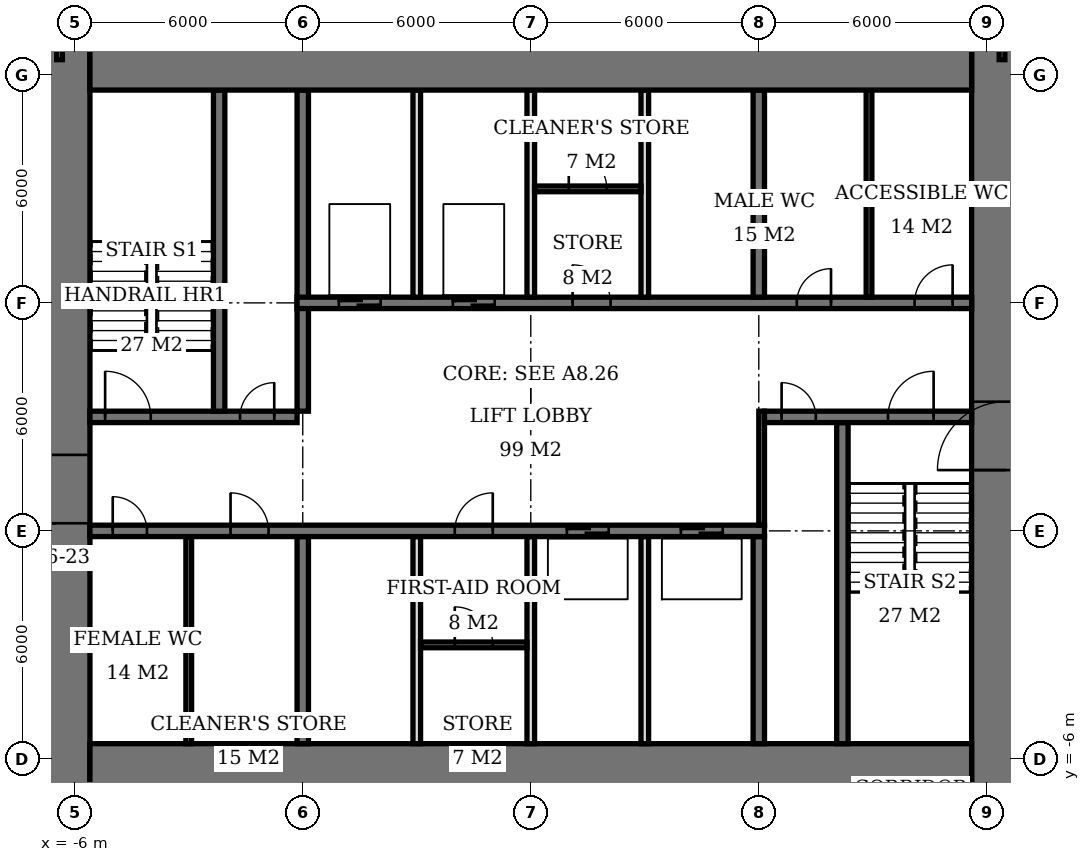
"""IFC4 building model, lengths in metres.
Left out: names, types, materials, properties, quantities, classifications, styles, units other than length and angle.
Written with IfcOpenShell. Run it as: python <this file> out.ifc"""

import sys

from ifc_helpers import new_model, si_unit, direction, frame, frame_2d, origin, place, context, subcontext, project, spatial, rectangle, extrude, element, fill, save


model = new_model("IFC4")
c1 = context("Model", 3, precision=1e-05, world=origin(), true_north=direction((0.0, 1.0)))
c2 = subcontext(c1, "Body", "Model", "MODEL_VIEW")
j1 = project(units=[si_unit("LENGTHUNIT", "METRE"), si_unit("PLANEANGLEUNIT", "RADIAN")], contexts=[c1])
p1 = place(None, origin())
s1 = spatial("IfcSite", under=j1, at=p1, CompositionType="ELEMENT")
p2 = place(p1, origin())
s2 = spatial("IfcBuilding", under=s1, at=p2, CompositionType="ELEMENT")
p3 = place(p2, frame((0.0, 0.0, 227.9)))
s3 = spatial("IfcBuildingStorey", under=s2, at=p3, CompositionType="ELEMENT", Elevation=227.9)
for number, where, z_axis, x_axis in (
    (1, (-5.6, -6.6, 0.0), (0.0, 0.0, 1.0), (1.0, 0.0, 0.0)),
    (2, (-5.6, 12.6, 0.0), (0.0, 0.0, 1.0), (1.0, 0.0, 0.0)),
):
    element("IfcWall", number, at=place(p3, frame(where, z_axis=z_axis, x_axis=x_axis)), inside=s3, PredefinedType="SHEAR", context=c2, shape_type="SweptSolid", body=[
        extrude(rectangle(XDim=23.2, YDim=2.0, at=frame_2d((11.6, 0.0))), origin(), (0.0, 0.0, 1.0), 3.9),
    ])
p4 = place(p3, frame((-6.5, -7.6, 0.0), z_axis=(0.0, 0.0, 1.0), x_axis=(0.0, 1.0, 0.0)))
e3 = element("IfcWall", 3, at=p4, inside=s3, PredefinedType="SHEAR", context=c2, shape_type="SweptSolid", body=[
    extrude(rectangle(XDim=21.2, YDim=1.8, at=frame_2d((10.6, 0.0))), origin(), (0.0, 0.0, 1.0), 3.9),
])
p5 = place(p4, frame((7.8, 0.0, 0.0)))
e4 = element("IfcOpeningElement", 4, at=p5, cuts=e3, PredefinedType="OPENING", context=c2, shape_type="SweptSolid", body=[
    extrude(rectangle(XDim=1.8, YDim=2.4, at=frame_2d((0.9, 1.2))), frame((0.0, 0.91, 0.0), z_axis=(0.0, -1.0, 0.0), x_axis=(1.0, 0.0, 0.0)), (0.0, 0.0, 1.0), 1.82),
])
p6 = place(p3, frame((18.5, -7.6, 0.0), z_axis=(0.0, 0.0, 1.0), x_axis=(0.0, 1.0, 0.0)))
e5 = element("IfcWall", 5, at=p6, inside=s3, PredefinedType="SHEAR", context=c2, shape_type="SweptSolid", body=[
    extrude(rectangle(XDim=21.2, YDim=1.8, at=frame_2d((10.6, 0.0))), origin(), (0.0, 0.0, 1.0), 3.9),
])
p7 = place(p6, frame((9.2, 0.0, 0.0)))
e6 = element("IfcOpeningElement", 6, at=p7, cuts=e5, PredefinedType="OPENING", context=c2, shape_type="SweptSolid", body=[
    extrude(rectangle(XDim=1.8, YDim=2.4, at=frame_2d((0.9, 1.2))), frame((0.0, 0.91, 0.0), z_axis=(0.0, -1.0, 0.0), x_axis=(1.0, 0.0, 0.0)), (0.0, 0.0, 1.0), 1.82),
])
p8 = place(p3, frame((-5.6, 0.0, 0.0), z_axis=(0.0, 0.0, 1.0), x_axis=(1.0, 0.0, 0.0)))
e7 = element("IfcWall", 7, at=p8, inside=s3, PredefinedType="SHEAR", context=c2, shape_type="SweptSolid", body=[
    extrude(rectangle(XDim=17.75, YDim=0.3, at=frame_2d((8.875, 0.0))), origin(), (0.0, 0.0, 1.0), 3.9),
])
p9 = place(p8, frame((0.6, 0.0, 0.0)))
e8 = element("IfcOpeningElement", 8, at=p9, cuts=e7, PredefinedType="OPENING", context=c2, shape_type="SweptSolid", body=[
    extrude(rectangle(XDim=0.9, YDim=2.1, at=frame_2d((0.45, 1.05))), frame((0.0, 0.16, 0.0), z_axis=(0.0, -1.0, 0.0), x_axis=(1.0, 0.0, 0.0)), (0.0, 0.0, 1.0), 0.32),
])
p10 = place(p8, frame((3.7, 0.0, 0.0)))
e9 = element("IfcOpeningElement", 9, at=p10, cuts=e7, PredefinedType="OPENING", context=c2, shape_type="SweptSolid", body=[
    extrude(rectangle(XDim=1.0, YDim=2.1, at=frame_2d((0.5, 1.05))), frame((0.0, 0.16, 0.0), z_axis=(0.0, -1.0, 0.0), x_axis=(1.0, 0.0, 0.0)), (0.0, 0.0, 1.0), 0.32),
])
p11 = place(p8, frame((9.6, 0.0, 0.0)))
e10 = element("IfcOpeningElement", 10, at=p11, cuts=e7, PredefinedType="OPENING", context=c2, shape_type="SweptSolid", body=[
    extrude(rectangle(XDim=1.0, YDim=2.1, at=frame_2d((0.5, 1.05))), frame((0.0, 0.16, 0.0), z_axis=(0.0, -1.0, 0.0), x_axis=(1.0, 0.0, 0.0)), (0.0, 0.0, 1.0), 0.32),
])
p12 = place(p8, frame((12.55, 0.0, 0.0)))
e11 = element("IfcOpeningElement", 11, at=p12, cuts=e7, PredefinedType="OPENING", context=c2, shape_type="SweptSolid", body=[
    extrude(rectangle(XDim=1.1, YDim=2.1, at=frame_2d((0.55, 1.05))), frame((0.0, 0.16, 0.0), z_axis=(0.0, -1.0, 0.0), x_axis=(1.0, 0.0, 0.0)), (0.0, 0.0, 1.0), 0.32),
])
p13 = place(p8, frame((15.55, 0.0, 0.0)))
e12 = element("IfcOpeningElement", 12, at=p13, cuts=e7, PredefinedType="OPENING", context=c2, shape_type="SweptSolid", body=[
    extrude(rectangle(XDim=1.1, YDim=2.1, at=frame_2d((0.55, 1.05))), frame((0.0, 0.16, 0.0), z_axis=(0.0, -1.0, 0.0), x_axis=(1.0, 0.0, 0.0)), (0.0, 0.0, 1.0), 0.32),
])
p14 = place(p3, frame((-5.6, 3.0, 0.0), z_axis=(0.0, 0.0, 1.0), x_axis=(1.0, 0.0, 0.0)))
e13 = element("IfcWall", 13, at=p14, inside=s3, PredefinedType="SHEAR", context=c2, shape_type="SweptSolid", body=[
    extrude(rectangle(XDim=5.45, YDim=0.3, at=frame_2d((2.725, 0.0))), origin(), (0.0, 0.0, 1.0), 3.9),
])
p15 = place(p14, frame((0.4, 0.0, 0.0)))
e14 = element("IfcOpeningElement", 14, at=p15, cuts=e13, PredefinedType="OPENING", context=c2, shape_type="SweptSolid", body=[
    extrude(rectangle(XDim=1.2, YDim=2.1, at=frame_2d((0.6, 1.05))), frame((0.0, 0.16, 0.0), z_axis=(0.0, -1.0, 0.0), x_axis=(1.0, 0.0, 0.0)), (0.0, 0.0, 1.0), 0.32),
])
p16 = place(p14, frame((3.95, 0.0, 0.0)))
e15 = element("IfcOpeningElement", 15, at=p16, cuts=e13, PredefinedType="OPENING", context=c2, shape_type="SweptSolid", body=[
    extrude(rectangle(XDim=0.9, YDim=2.1, at=frame_2d((0.45, 1.05))), frame((0.0, 0.16, 0.0), z_axis=(0.0, -1.0, 0.0), x_axis=(1.0, 0.0, 0.0)), (0.0, 0.0, 1.0), 0.32),
])
p17 = place(p3, frame((12.15, 3.0, 0.0), z_axis=(0.0, 0.0, 1.0), x_axis=(1.0, 0.0, 0.0)))
e16 = element("IfcWall", 16, at=p17, inside=s3, PredefinedType="SHEAR", context=c2, shape_type="SweptSolid", body=[
    extrude(rectangle(XDim=5.45, YDim=0.3, at=frame_2d((2.725, 0.0))), origin(), (0.0, 0.0, 1.0), 3.9),
])
p18 = place(p17, frame((3.25, 0.0, 0.0)))
e17 = element("IfcOpeningElement", 17, at=p18, cuts=e16, PredefinedType="OPENING", context=c2, shape_type="SweptSolid", body=[
    extrude(rectangle(XDim=1.2, YDim=2.1, at=frame_2d((0.6, 1.05))), frame((0.0, 0.16, 0.0), z_axis=(0.0, -1.0, 0.0), x_axis=(1.0, 0.0, 0.0)), (0.0, 0.0, 1.0), 0.32),
])
p19 = place(p17, frame((0.45, 0.0, 0.0)))
e18 = element("IfcOpeningElement", 18, at=p19, cuts=e16, PredefinedType="OPENING", context=c2, shape_type="SweptSolid", body=[
    extrude(rectangle(XDim=0.9, YDim=2.1, at=frame_2d((0.45, 1.05))), frame((0.0, 0.16, 0.0), z_axis=(0.0, -1.0, 0.0), x_axis=(1.0, 0.0, 0.0)), (0.0, 0.0, 1.0), 0.32),
])
p20 = place(p3, frame((-0.15, 6.0, 0.0), z_axis=(0.0, 0.0, 1.0), x_axis=(1.0, 0.0, 0.0)))
e19 = element("IfcWall", 19, at=p20, inside=s3, PredefinedType="SHEAR", context=c2, shape_type="SweptSolid", body=[
    extrude(rectangle(XDim=17.75, YDim=0.3, at=frame_2d((8.875, 0.0))), origin(), (0.0, 0.0, 1.0), 3.9),
])
p21 = place(p20, frame((13.15, 0.0, 0.0)))
e20 = element("IfcOpeningElement", 20, at=p21, cuts=e19, PredefinedType="OPENING", context=c2, shape_type="SweptSolid", body=[
    extrude(rectangle(XDim=0.9, YDim=2.1, at=frame_2d((0.45, 1.05))), frame((0.0, 0.16, 0.0), z_axis=(0.0, -1.0, 0.0), x_axis=(1.0, 0.0, 0.0)), (0.0, 0.0, 1.0), 0.32),
])
p22 = place(p20, frame((16.25, 0.0, 0.0)))
e21 = element("IfcOpeningElement", 21, at=p22, cuts=e19, PredefinedType="OPENING", context=c2, shape_type="SweptSolid", body=[
    extrude(rectangle(XDim=1.0, YDim=2.1, at=frame_2d((0.5, 1.05))), frame((0.0, 0.16, 0.0), z_axis=(0.0, -1.0, 0.0), x_axis=(1.0, 0.0, 0.0)), (0.0, 0.0, 1.0), 0.32),
])
p23 = place(p20, frame((7.25, 0.0, 0.0)))
e22 = element("IfcOpeningElement", 22, at=p23, cuts=e19, PredefinedType="OPENING", context=c2, shape_type="SweptSolid", body=[
    extrude(rectangle(XDim=1.0, YDim=2.1, at=frame_2d((0.5, 1.05))), frame((0.0, 0.16, 0.0), z_axis=(0.0, -1.0, 0.0), x_axis=(1.0, 0.0, 0.0)), (0.0, 0.0, 1.0), 0.32),
])
p24 = place(p20, frame((1.1, 0.0, 0.0)))
e23 = element("IfcOpeningElement", 23, at=p24, cuts=e19, PredefinedType="OPENING", context=c2, shape_type="SweptSolid", body=[
    extrude(rectangle(XDim=1.1, YDim=2.1, at=frame_2d((0.55, 1.05))), frame((0.0, 0.16, 0.0), z_axis=(0.0, -1.0, 0.0), x_axis=(1.0, 0.0, 0.0)), (0.0, 0.0, 1.0), 0.32),
])
p25 = place(p20, frame((4.1, 0.0, 0.0)))
e24 = element("IfcOpeningElement", 24, at=p25, cuts=e19, PredefinedType="OPENING", context=c2, shape_type="SweptSolid", body=[
    extrude(rectangle(XDim=1.1, YDim=2.1, at=frame_2d((0.55, 1.05))), frame((0.0, 0.16, 0.0), z_axis=(0.0, -1.0, 0.0), x_axis=(1.0, 0.0, 0.0)), (0.0, 0.0, 1.0), 0.32),
])
p26 = place(p3, frame((0.0, -5.6, 0.0), z_axis=(0.0, 0.0, 1.0), x_axis=(0.0, 1.0, 0.0)))
e25 = element("IfcWall", 25, at=p26, inside=s3, PredefinedType="SHEAR", context=c2, shape_type="SweptSolid", body=[
    extrude(rectangle(XDim=5.45, YDim=0.3, at=frame_2d((2.725, 0.0))), origin(), (0.0, 0.0, 1.0), 3.9),
])
p27 = place(p3, frame((0.0, 3.15, 0.0), z_axis=(0.0, 0.0, 1.0), x_axis=(0.0, 1.0, 0.0)))
e26 = element("IfcWall", 26, at=p27, inside=s3, PredefinedType="SHEAR", context=c2, shape_type="SweptSolid", body=[
    extrude(rectangle(XDim=8.45, YDim=0.3, at=frame_2d((4.225, 0.0))), origin(), (0.0, 0.0, 1.0), 3.9),
])
for number, where, z_axis, x_axis in (
    (27, (12.0, -5.6, 0.0), (0.0, 0.0, 1.0), (0.0, 1.0, 0.0)),
    (28, (12.0, 6.15, 0.0), (0.0, 0.0, 1.0), (0.0, 1.0, 0.0)),
):
    element("IfcWall", number, at=place(p3, frame(where, z_axis=z_axis, x_axis=x_axis)), inside=s3, PredefinedType="SHEAR", context=c2, shape_type="SweptSolid", body=[
        extrude(rectangle(XDim=5.45, YDim=0.3, at=frame_2d((2.725, 0.0))), origin(), (0.0, 0.0, 1.0), 3.9),
    ])
for number, where, z_axis, x_axis in (
    (29, (-2.2, 3.15, 0.0), (0.0, 0.0, 1.0), (0.0, 1.0, 0.0)),
    (30, (14.2, -5.6, 0.0), (0.0, 0.0, 1.0), (0.0, 1.0, 0.0)),
):
    element("IfcWall", number, at=place(p3, frame(where, z_axis=z_axis, x_axis=x_axis)), inside=s3, PredefinedType="SHEAR", context=c2, shape_type="SweptSolid", body=[
        extrude(rectangle(XDim=8.45, YDim=0.3, at=frame_2d((4.225, 0.0))), origin(), (0.0, 0.0, 1.0), 3.9),
    ])
for number, where, z_axis, x_axis in (
    (31, (3.0, 6.15, 0.0), (0.0, 0.0, 1.0), (0.0, 1.0, 0.0)),
    (32, (6.0, 6.15, 0.0), (0.0, 0.0, 1.0), (0.0, 1.0, 0.0)),
    (33, (9.0, 6.15, 0.0), (0.0, 0.0, 1.0), (0.0, 1.0, 0.0)),
    (34, (3.0, -5.6, 0.0), (0.0, 0.0, 1.0), (0.0, 1.0, 0.0)),
    (35, (6.0, -5.6, 0.0), (0.0, 0.0, 1.0), (0.0, 1.0, 0.0)),
    (36, (9.0, -5.6, 0.0), (0.0, 0.0, 1.0), (0.0, 1.0, 0.0)),
):
    element("IfcWall", number, at=place(p3, frame(where, z_axis=z_axis, x_axis=x_axis)), inside=s3, PredefinedType="SOLIDWALL", context=c2, shape_type="SweptSolid", body=[
        extrude(rectangle(XDim=5.45, YDim=0.2, at=frame_2d((2.725, 0.0))), origin(), (0.0, 0.0, 1.0), 3.9),
    ])
for number, where, z_axis, x_axis in (
    (37, (-3.0, -5.6, 0.0), (0.0, 0.0, 1.0), (0.0, 1.0, 0.0)),
    (38, (14.9, 6.15, 0.0), (0.0, 0.0, 1.0), (0.0, 1.0, 0.0)),
):
    element("IfcWall", number, at=place(p3, frame(where, z_axis=z_axis, x_axis=x_axis)), inside=s3, PredefinedType="PLUMBINGWALL", context=c2, shape_type="SweptSolid", body=[
        extrude(rectangle(XDim=5.45, YDim=0.15, at=frame_2d((2.725, 0.0))), origin(), (0.0, 0.0, 1.0), 3.65),
    ])
p28 = place(p3, frame((6.1, 9.0, 0.0), z_axis=(0.0, 0.0, 1.0), x_axis=(1.0, 0.0, 0.0)))
e39 = element("IfcWall", 39, at=p28, inside=s3, PredefinedType="PARTITIONING", context=c2, shape_type="SweptSolid", body=[
    extrude(rectangle(XDim=2.8, YDim=0.15, at=frame_2d((1.4, 0.0))), origin(), (0.0, 0.0, 1.0), 3.65),
])
p29 = place(p28, frame((0.9, 0.0, 0.0)))
e40 = element("IfcOpeningElement", 40, at=p29, cuts=e39, PredefinedType="OPENING", context=c2, shape_type="SweptSolid", body=[
    extrude(rectangle(XDim=1.0, YDim=2.1, at=frame_2d((0.5, 1.05))), frame((0.0, 0.085, 0.0), z_axis=(0.0, -1.0, 0.0), x_axis=(1.0, 0.0, 0.0)), (0.0, 0.0, 1.0), 0.17),
])
p30 = place(p3, frame((3.1, -3.0, 0.0), z_axis=(0.0, 0.0, 1.0), x_axis=(1.0, 0.0, 0.0)))
e41 = element("IfcWall", 41, at=p30, inside=s3, PredefinedType="PARTITIONING", context=c2, shape_type="SweptSolid", body=[
    extrude(rectangle(XDim=2.8, YDim=0.15, at=frame_2d((1.4, 0.0))), origin(), (0.0, 0.0, 1.0), 3.65),
])
p31 = place(p30, frame((0.9, 0.0, 0.0)))
e42 = element("IfcOpeningElement", 42, at=p31, cuts=e41, PredefinedType="OPENING", context=c2, shape_type="SweptSolid", body=[
    extrude(rectangle(XDim=1.0, YDim=2.1, at=frame_2d((0.5, 1.05))), frame((0.0, 0.085, 0.0), z_axis=(0.0, -1.0, 0.0), x_axis=(1.0, 0.0, 0.0)), (0.0, 0.0, 1.0), 0.17),
])
p32 = place(p3, frame((-6.4, 12.4, 0.0), z_axis=(0.0, 0.0, 1.0), x_axis=(0.0, 1.0, 0.0)))
e43 = element("IfcWall", 43, at=p32, inside=s3, PredefinedType="PARTITIONING", context=c2, shape_type="SweptSolid", body=[
    extrude(rectangle(XDim=1.2, YDim=0.15, at=frame_2d((0.6, 0.0))), origin(), (0.0, 0.0, 1.0), 3.65),
])
p33 = place(p3, frame((1.5, 12.4, 0.0), z_axis=(0.0, 0.0, 1.0), x_axis=(0.0, 1.0, 0.0)))
e44 = element("IfcWall", 44, at=p33, inside=s3, PredefinedType="PARTITIONING", context=c2, shape_type="SweptSolid", body=[
    extrude(rectangle(XDim=7.025, YDim=0.15, at=frame_2d((3.513, 0.0))), origin(), (0.0, 0.0, 1.0), 3.65),
])
p34 = place(p3, frame((18.4, 12.4, 0.0), z_axis=(0.0, 0.0, 1.0), x_axis=(0.0, 1.0, 0.0)))
e45 = element("IfcWall", 45, at=p34, inside=s3, PredefinedType="PARTITIONING", context=c2, shape_type="SweptSolid", body=[
    extrude(rectangle(XDim=1.2, YDim=0.15, at=frame_2d((0.6, 0.0))), origin(), (0.0, 0.0, 1.0), 3.65),
])
p35 = place(p3, frame((12.075, 0.15, 0.0), z_axis=(0.0, 0.0, 1.0), x_axis=(0.0, 1.0, 0.0)))
e46 = element("IfcWall", 46, at=p35, inside=s3, PredefinedType="PARTITIONING", context=c2, shape_type="SweptSolid", body=[
    extrude(rectangle(XDim=3.0, YDim=0.15, at=frame_2d((1.5, 0.0))), origin(), (0.0, 0.0, 1.0), 3.65),
])
p36 = place(p5, origin())
e47 = element("IfcDoor", 47, at=p36, inside=s3, OperationType="DOUBLE_DOOR_SINGLE_SWING", PredefinedType="DOOR", context=c2, shape_type="SweptSolid", body=[
    extrude(rectangle(XDim=1.8, YDim=2.4, at=frame_2d((0.9, 1.2))), frame((0.0, 0.025, 0.0), z_axis=(0.0, -1.0, 0.0), x_axis=(1.0, 0.0, 0.0)), (0.0, 0.0, 1.0), 0.05),
])
fill(e4, e47)
p37 = place(p7, origin())
e48 = element("IfcDoor", 48, at=p37, inside=s3, OperationType="DOUBLE_DOOR_SINGLE_SWING", PredefinedType="DOOR", context=c2, shape_type="SweptSolid", body=[
    extrude(rectangle(XDim=1.8, YDim=2.4, at=frame_2d((0.9, 1.2))), frame((0.0, 0.025, 0.0), z_axis=(0.0, -1.0, 0.0), x_axis=(1.0, 0.0, 0.0)), (0.0, 0.0, 1.0), 0.05),
])
fill(e6, e48)
p38 = place(p15, origin())
e49 = element("IfcDoor", 49, at=p38, inside=s3, OperationType="SINGLE_SWING_LEFT", PredefinedType="DOOR", context=c2, shape_type="SweptSolid", body=[
    extrude(rectangle(XDim=1.2, YDim=2.1, at=frame_2d((0.6, 1.05))), frame((0.0, 0.025, 0.0), z_axis=(0.0, -1.0, 0.0), x_axis=(1.0, 0.0, 0.0)), (0.0, 0.0, 1.0), 0.05),
])
fill(e14, e49)
p39 = place(p16, origin())
e50 = element("IfcDoor", 50, at=p39, inside=s3, OperationType="SINGLE_SWING_RIGHT", PredefinedType="DOOR", context=c2, shape_type="SweptSolid", body=[
    extrude(rectangle(XDim=0.9, YDim=2.1, at=frame_2d((0.45, 1.05))), frame((0.0, 0.025, 0.0), z_axis=(0.0, -1.0, 0.0), x_axis=(1.0, 0.0, 0.0)), (0.0, 0.0, 1.0), 0.05),
])
fill(e15, e50)
p40 = place(p18, origin())
e51 = element("IfcDoor", 51, at=p40, inside=s3, OperationType="SINGLE_SWING_RIGHT", PredefinedType="DOOR", context=c2, shape_type="SweptSolid", body=[
    extrude(rectangle(XDim=1.2, YDim=2.1, at=frame_2d((0.6, 1.05))), frame((0.0, 0.025, 0.0), z_axis=(0.0, -1.0, 0.0), x_axis=(1.0, 0.0, 0.0)), (0.0, 0.0, 1.0), 0.05),
])
fill(e17, e51)
p41 = place(p19, origin())
e52 = element("IfcDoor", 52, at=p41, inside=s3, OperationType="SINGLE_SWING_LEFT", PredefinedType="DOOR", context=c2, shape_type="SweptSolid", body=[
    extrude(rectangle(XDim=0.9, YDim=2.1, at=frame_2d((0.45, 1.05))), frame((0.0, 0.025, 0.0), z_axis=(0.0, -1.0, 0.0), x_axis=(1.0, 0.0, 0.0)), (0.0, 0.0, 1.0), 0.05),
])
fill(e18, e52)
p42 = place(p9, origin())
e53 = element("IfcDoor", 53, at=p42, inside=s3, OperationType="SINGLE_SWING_LEFT", PredefinedType="DOOR", context=c2, shape_type="SweptSolid", body=[
    extrude(rectangle(XDim=0.9, YDim=2.1, at=frame_2d((0.45, 1.05))), frame((0.0, 0.025, 0.0), z_axis=(0.0, -1.0, 0.0), x_axis=(1.0, 0.0, 0.0)), (0.0, 0.0, 1.0), 0.05),
])
fill(e8, e53)
p43 = place(p10, origin())
e54 = element("IfcDoor", 54, at=p43, inside=s3, OperationType="SINGLE_SWING_LEFT", PredefinedType="DOOR", context=c2, shape_type="SweptSolid", body=[
    extrude(rectangle(XDim=1.0, YDim=2.1, at=frame_2d((0.5, 1.05))), frame((0.0, 0.025, 0.0), z_axis=(0.0, -1.0, 0.0), x_axis=(1.0, 0.0, 0.0)), (0.0, 0.0, 1.0), 0.05),
])
fill(e9, e54)
p44 = place(p21, origin())
e55 = element("IfcDoor", 55, at=p44, inside=s3, OperationType="SINGLE_SWING_RIGHT", PredefinedType="DOOR", context=c2, shape_type="SweptSolid", body=[
    extrude(rectangle(XDim=0.9, YDim=2.1, at=frame_2d((0.45, 1.05))), frame((0.0, 0.025, 0.0), z_axis=(0.0, -1.0, 0.0), x_axis=(1.0, 0.0, 0.0)), (0.0, 0.0, 1.0), 0.05),
])
fill(e20, e55)
p45 = place(p22, origin())
e56 = element("IfcDoor", 56, at=p45, inside=s3, OperationType="SINGLE_SWING_RIGHT", PredefinedType="DOOR", context=c2, shape_type="SweptSolid", body=[
    extrude(rectangle(XDim=1.0, YDim=2.1, at=frame_2d((0.5, 1.05))), frame((0.0, 0.025, 0.0), z_axis=(0.0, -1.0, 0.0), x_axis=(1.0, 0.0, 0.0)), (0.0, 0.0, 1.0), 0.05),
])
fill(e21, e56)
p46 = place(p29, origin())
e57 = element("IfcDoor", 57, at=p46, inside=s3, OperationType="SINGLE_SWING_LEFT", PredefinedType="DOOR", context=c2, shape_type="SweptSolid", body=[
    extrude(rectangle(XDim=1.0, YDim=2.1, at=frame_2d((0.5, 1.05))), frame((0.0, 0.025, 0.0), z_axis=(0.0, -1.0, 0.0), x_axis=(1.0, 0.0, 0.0)), (0.0, 0.0, 1.0), 0.05),
])
fill(e40, e57)
p47 = place(p23, origin())
e58 = element("IfcDoor", 58, at=p47, inside=s3, OperationType="SINGLE_SWING_LEFT", PredefinedType="DOOR", context=c2, shape_type="SweptSolid", body=[
    extrude(rectangle(XDim=1.0, YDim=2.1, at=frame_2d((0.5, 1.05))), frame((0.0, 0.025, 0.0), z_axis=(0.0, -1.0, 0.0), x_axis=(1.0, 0.0, 0.0)), (0.0, 0.0, 1.0), 0.05),
])
fill(e22, e58)
p48 = place(p31, origin())
e59 = element("IfcDoor", 59, at=p48, inside=s3, OperationType="SINGLE_SWING_LEFT", PredefinedType="DOOR", context=c2, shape_type="SweptSolid", body=[
    extrude(rectangle(XDim=1.0, YDim=2.1, at=frame_2d((0.5, 1.05))), frame((0.0, 0.025, 0.0), z_axis=(0.0, -1.0, 0.0), x_axis=(1.0, 0.0, 0.0)), (0.0, 0.0, 1.0), 0.05),
])
fill(e42, e59)
p49 = place(p11, origin())
e60 = element("IfcDoor", 60, at=p49, inside=s3, OperationType="SINGLE_SWING_RIGHT", PredefinedType="DOOR", context=c2, shape_type="SweptSolid", body=[
    extrude(rectangle(XDim=1.0, YDim=2.1, at=frame_2d((0.5, 1.05))), frame((0.0, 0.025, 0.0), z_axis=(0.0, -1.0, 0.0), x_axis=(1.0, 0.0, 0.0)), (0.0, 0.0, 1.0), 0.05),
])
fill(e10, e60)
p50 = place(p24, origin())
e61 = element("IfcDoor", 61, at=p50, inside=s3, OperationType="DOUBLE_DOOR_SLIDING", PredefinedType="USERDEFINED", context=c2, shape_type="SweptSolid", body=[
    extrude(rectangle(XDim=1.1, YDim=2.1, at=frame_2d((0.55, 1.05))), frame((0.0, 0.025, 0.0), z_axis=(0.0, -1.0, 0.0), x_axis=(1.0, 0.0, 0.0)), (0.0, 0.0, 1.0), 0.05),
])
fill(e23, e61)
p51 = place(p25, origin())
e62 = element("IfcDoor", 62, at=p51, inside=s3, OperationType="DOUBLE_DOOR_SLIDING", PredefinedType="USERDEFINED", context=c2, shape_type="SweptSolid", body=[
    extrude(rectangle(XDim=1.1, YDim=2.1, at=frame_2d((0.55, 1.05))), frame((0.0, 0.025, 0.0), z_axis=(0.0, -1.0, 0.0), x_axis=(1.0, 0.0, 0.0)), (0.0, 0.0, 1.0), 0.05),
])
fill(e24, e62)
p52 = place(p12, origin())
e63 = element("IfcDoor", 63, at=p52, inside=s3, OperationType="DOUBLE_DOOR_SLIDING", PredefinedType="USERDEFINED", context=c2, shape_type="SweptSolid", body=[
    extrude(rectangle(XDim=1.1, YDim=2.1, at=frame_2d((0.55, 1.05))), frame((0.0, 0.025, 0.0), z_axis=(0.0, -1.0, 0.0), x_axis=(1.0, 0.0, 0.0)), (0.0, 0.0, 1.0), 0.05),
])
fill(e11, e63)
p53 = place(p13, origin())
e64 = element("IfcDoor", 64, at=p53, inside=s3, OperationType="DOUBLE_DOOR_SLIDING", PredefinedType="USERDEFINED", context=c2, shape_type="SweptSolid", body=[
    extrude(rectangle(XDim=1.1, YDim=2.1, at=frame_2d((0.55, 1.05))), frame((0.0, 0.025, 0.0), z_axis=(0.0, -1.0, 0.0), x_axis=(1.0, 0.0, 0.0)), (0.0, 0.0, 1.0), 0.05),
])
fill(e12, e64)
save(model, sys.argv[1])
